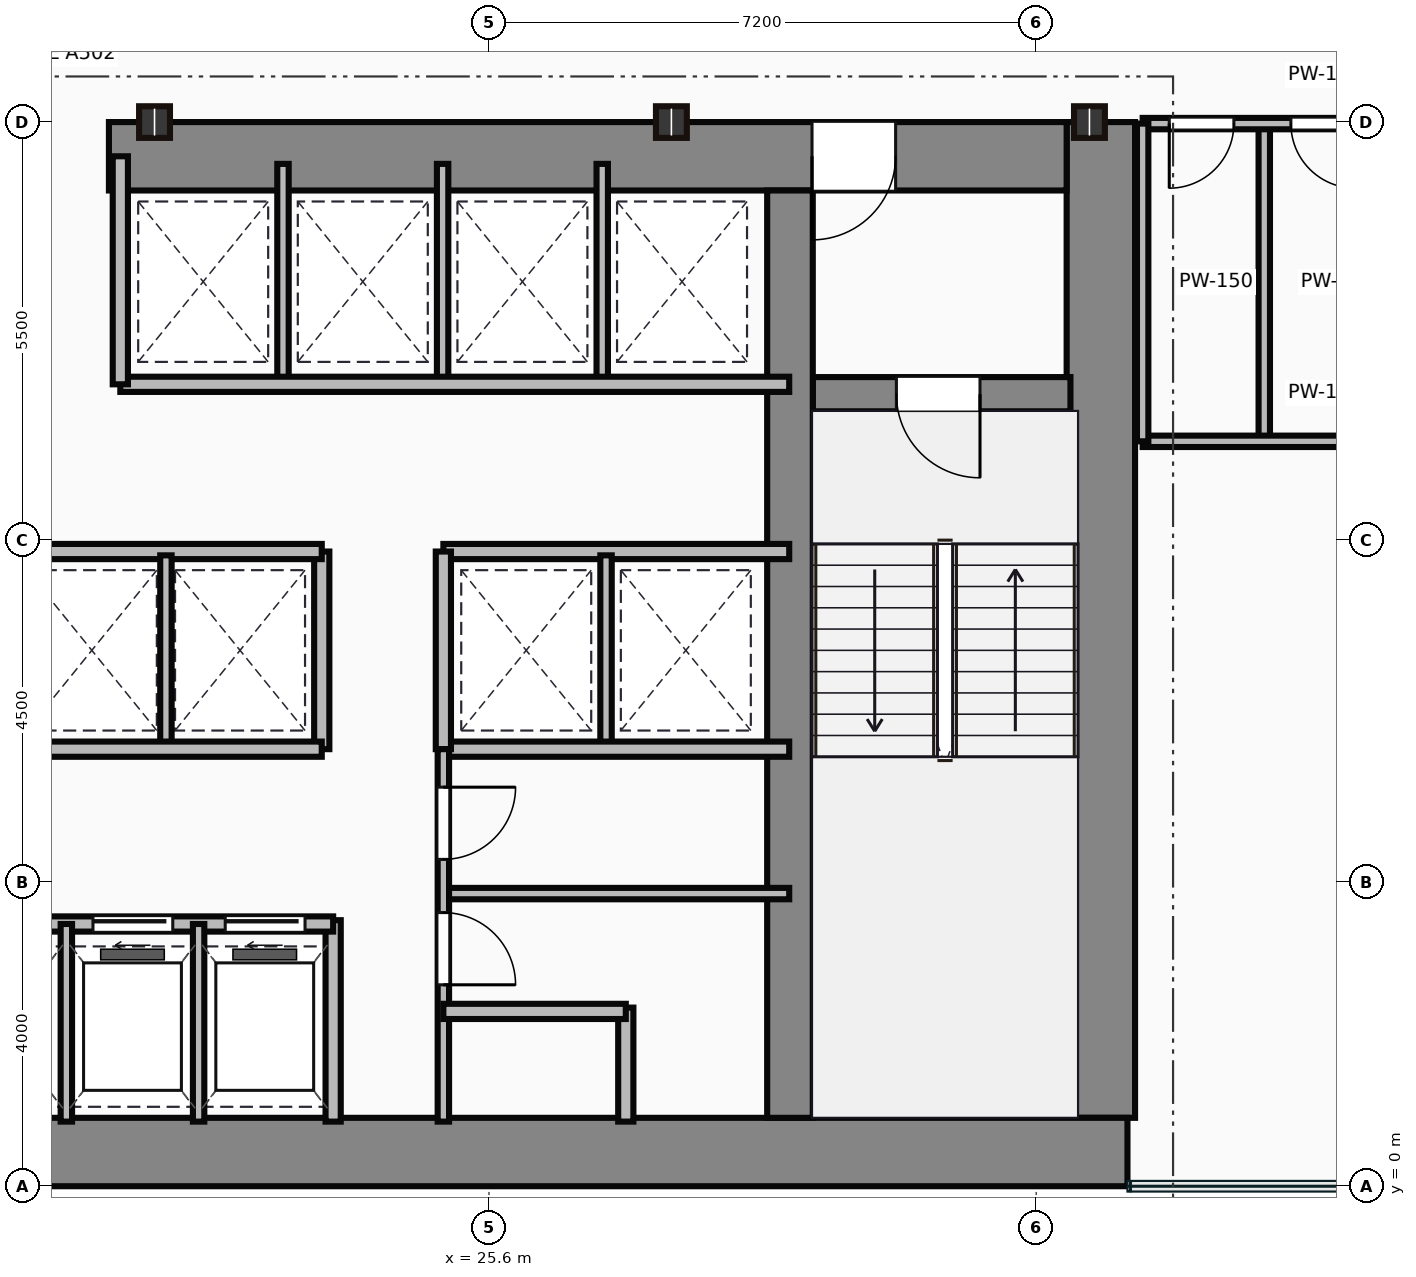
"""IFC4 building model, lengths in metres.
Left out: names, types, materials, properties, quantities, classifications, styles, units other than length and angle.
Written with IfcOpenShell. Run it as: python <this file> out.ifc"""

import sys

from ifc_helpers import new_model, si_unit, direction, frame, frame_2d, origin, origin_2d, place, context, subcontext, project, spatial, rectangle, i_section, extrude, source, transform, mapped, element, fill, save


model = new_model("IFC4")
c1 = context("Model", 3, precision=1e-05, world=origin(), true_north=direction((0.0, 1.0)))
c2 = subcontext(c1, "Body", "Model", "MODEL_VIEW")
j1 = project(units=[si_unit("LENGTHUNIT", "METRE"), si_unit("PLANEANGLEUNIT", "RADIAN")], contexts=[c1])
p1 = place(None, origin())
s1 = spatial("IfcSite", under=j1, at=p1, CompositionType="ELEMENT")
p2 = place(p1, origin())
s2 = spatial("IfcBuilding", under=s1, at=p2, CompositionType="ELEMENT")
p3 = place(p2, frame((0.0, 0.0, 32.5)))
s3 = spatial("IfcBuildingStorey", under=s2, at=p3, CompositionType="ELEMENT", Elevation=32.5)
m1 = source(origin(), c2, "Body", "SweptSolid", [
    extrude(rectangle(XDim=29.5, YDim=0.9, at=frame_2d((14.75, 0.0))), origin(), (0.0, 0.0, 1.0), 3.65),
])
p4 = place(p3, frame((4.5, 0.45, 0.0), z_axis=(0.0, 0.0, 1.0), x_axis=(1.0, 0.0, 0.0)))
e1 = element("IfcWall", 1, at=p4, inside=s3, PredefinedType="SHEAR", context=c2, shape_type="MappedRepresentation", body=[
    mapped(m1, transform((0.0, 0.0, 0.0))),
])
m2 = source(origin(), c2, "Body", "SweptSolid", [
    extrude(rectangle(XDim=13.1, YDim=0.9, at=frame_2d((6.55, 0.0))), origin(), (0.0, 0.0, 1.0), 3.65),
])
p5 = place(p3, frame((33.65, 0.9, 0.0), z_axis=(0.0, 0.0, 1.0), x_axis=(0.0, 1.0, 0.0)))
e2 = element("IfcWall", 2, at=p5, inside=s3, PredefinedType="SHEAR", context=c2, shape_type="MappedRepresentation", body=[
    mapped(m2, transform((0.0, 0.0, 0.0))),
])
m3 = source(origin(), c2, "Body", "SweptSolid", [
    extrude(rectangle(XDim=12.6, YDim=0.9, at=frame_2d((6.3, 0.0))), origin(), (0.0, 0.0, 1.0), 3.65),
])
p6 = place(p3, frame((20.6, 13.55, 0.0), z_axis=(0.0, 0.0, 1.0), x_axis=(1.0, 0.0, 0.0)))
e3 = element("IfcWall", 3, at=p6, inside=s3, PredefinedType="SHEAR", context=c2, shape_type="MappedRepresentation", body=[
    mapped(m3, transform((0.0, 0.0, 0.0))),
])
p7 = place(p6, frame((9.25, 0.0, 0.0)))
e4 = element("IfcOpeningElement", 4, at=p7, cuts=e3, PredefinedType="OPENING", context=c2, shape_type="SweptSolid", body=[
    extrude(rectangle(XDim=1.1, YDim=2.15, at=frame_2d((0.55, 1.075))), frame((0.0, 0.46, 0.0), z_axis=(0.0, -1.0, 0.0), x_axis=(1.0, 0.0, 0.0)), (0.0, 0.0, 1.0), 0.92),
])
m4 = source(origin(), c2, "Body", "SweptSolid", [
    extrude(rectangle(XDim=12.2, YDim=0.6, at=frame_2d((6.1, 0.0))), origin(), (0.0, 0.0, 1.0), 3.65),
])
p8 = place(p3, frame((29.56, 0.9, 0.0), z_axis=(0.0, 0.0, 1.0), x_axis=(0.0, 1.0, 0.0)))
e5 = element("IfcWall", 5, at=p8, inside=s3, PredefinedType="SHEAR", context=c2, shape_type="MappedRepresentation", body=[
    mapped(m4, transform((0.0, 0.0, 0.0))),
])
m5 = source(origin(), c2, "Body", "SweptSolid", [
    extrude(rectangle(XDim=3.39, YDim=0.45, at=frame_2d((1.695, 0.0))), origin(), (0.0, 0.0, 1.0), 3.65),
])
p9 = place(p3, frame((29.86, 10.42, 0.0), z_axis=(0.0, 0.0, 1.0), x_axis=(1.0, 0.0, 0.0)))
e6 = element("IfcWall", 6, at=p9, inside=s3, PredefinedType="SHEAR", context=c2, shape_type="MappedRepresentation", body=[
    mapped(m5, transform((0.0, 0.0, 0.0))),
])
p10 = place(p9, frame((1.1, 0.0, 0.0)))
e7 = element("IfcOpeningElement", 7, at=p10, cuts=e6, PredefinedType="OPENING", context=c2, shape_type="SweptSolid", body=[
    extrude(rectangle(XDim=1.1, YDim=2.15, at=frame_2d((0.55, 1.075))), frame((0.0, 0.235, 0.0), z_axis=(0.0, -1.0, 0.0), x_axis=(1.0, 0.0, 0.0)), (0.0, 0.0, 1.0), 0.47),
])
m6 = source(origin(), c2, "Body", "SweptSolid", [
    extrude(i_section(OverallWidth=0.406, OverallDepth=0.416, WebThickness=0.03, FlangeThickness=0.048, at=origin_2d()), origin(), (0.0, 0.0, 1.0), 3.65),
])
for number, where, z_axis, x_axis in (
    (8, (21.2, 14.0, 0.0), (0.0, 0.0, 1.0), (1.0, 0.0, 0.0)),
    (9, (28.0, 14.0, 0.0), (0.0, 0.0, 1.0), (1.0, 0.0, 0.0)),
    (10, (33.5, 14.0, 0.0), (0.0, 0.0, 1.0), (1.0, 0.0, 0.0)),
):
    element("IfcColumn", number, at=place(p3, frame(where, z_axis=z_axis, x_axis=x_axis)), inside=s3, PredefinedType="COLUMN", context=c2, shape_type="MappedRepresentation", body=[
        mapped(m6, transform((0.0, 0.0, 0.0))),
    ])
m7 = source(origin(), c2, "Body", "SweptSolid", [
    extrude(rectangle(XDim=10.5, YDim=0.2, at=frame_2d((5.25, 0.0))), origin(), (0.0, 0.0, 1.0), 3.4),
])
p11 = place(p3, frame((13.05, 3.45, 0.0), z_axis=(0.0, 0.0, 1.0), x_axis=(1.0, 0.0, 0.0)))
e11 = element("IfcWall", 11, at=p11, inside=s3, PredefinedType="PARTITIONING", context=c2, shape_type="MappedRepresentation", body=[
    mapped(m7, transform((0.0, 0.0, 0.0))),
])
p12 = place(p11, frame((0.38, 0.0, 0.0)))
e12 = element("IfcOpeningElement", 12, at=p12, cuts=e11, PredefinedType="OPENING", context=c2, shape_type="SweptSolid", body=[
    extrude(rectangle(XDim=1.05, YDim=2.15, at=frame_2d((0.525, 1.075))), frame((0.0, 0.11, 0.0), z_axis=(0.0, -1.0, 0.0), x_axis=(1.0, 0.0, 0.0)), (0.0, 0.0, 1.0), 0.22),
])
p13 = place(p11, frame((2.12, 0.0, 0.0)))
e13 = element("IfcOpeningElement", 13, at=p13, cuts=e11, PredefinedType="OPENING", context=c2, shape_type="SweptSolid", body=[
    extrude(rectangle(XDim=1.05, YDim=2.15, at=frame_2d((0.525, 1.075))), frame((0.0, 0.11, 0.0), z_axis=(0.0, -1.0, 0.0), x_axis=(1.0, 0.0, 0.0)), (0.0, 0.0, 1.0), 0.22),
])
p14 = place(p11, frame((3.86, 0.0, 0.0)))
e14 = element("IfcOpeningElement", 14, at=p14, cuts=e11, PredefinedType="OPENING", context=c2, shape_type="SweptSolid", body=[
    extrude(rectangle(XDim=1.05, YDim=2.15, at=frame_2d((0.525, 1.075))), frame((0.0, 0.11, 0.0), z_axis=(0.0, -1.0, 0.0), x_axis=(1.0, 0.0, 0.0)), (0.0, 0.0, 1.0), 0.22),
])
p15 = place(p11, frame((5.6, 0.0, 0.0)))
e15 = element("IfcOpeningElement", 15, at=p15, cuts=e11, PredefinedType="OPENING", context=c2, shape_type="SweptSolid", body=[
    extrude(rectangle(XDim=1.05, YDim=2.15, at=frame_2d((0.525, 1.075))), frame((0.0, 0.11, 0.0), z_axis=(0.0, -1.0, 0.0), x_axis=(1.0, 0.0, 0.0)), (0.0, 0.0, 1.0), 0.22),
])
p16 = place(p11, frame((7.34, 0.0, 0.0)))
e16 = element("IfcOpeningElement", 16, at=p16, cuts=e11, PredefinedType="OPENING", context=c2, shape_type="SweptSolid", body=[
    extrude(rectangle(XDim=1.05, YDim=2.15, at=frame_2d((0.525, 1.075))), frame((0.0, 0.11, 0.0), z_axis=(0.0, -1.0, 0.0), x_axis=(1.0, 0.0, 0.0)), (0.0, 0.0, 1.0), 0.22),
])
p17 = place(p11, frame((9.08, 0.0, 0.0)))
e17 = element("IfcOpeningElement", 17, at=p17, cuts=e11, PredefinedType="OPENING", context=c2, shape_type="SweptSolid", body=[
    extrude(rectangle(XDim=1.05, YDim=2.15, at=frame_2d((0.525, 1.075))), frame((0.0, 0.11, 0.0), z_axis=(0.0, -1.0, 0.0), x_axis=(1.0, 0.0, 0.0)), (0.0, 0.0, 1.0), 0.22),
])
m8 = source(origin(), c2, "Body", "SweptSolid", [
    extrude(rectangle(XDim=2.65, YDim=0.2, at=frame_2d((1.325, 0.0))), origin(), (0.0, 0.0, 1.0), 3.4),
])
p18 = place(p3, frame((23.55, 0.85, 0.0), z_axis=(0.0, 0.0, 1.0), x_axis=(0.0, 1.0, 0.0)))
e18 = element("IfcWall", 18, at=p18, inside=s3, PredefinedType="PARTITIONING", context=c2, shape_type="MappedRepresentation", body=[
    mapped(m8, transform((0.0, 0.0, 0.0))),
])
m9 = source(origin(), c2, "Body", "SweptSolid", [
    extrude(rectangle(XDim=2.6, YDim=0.15, at=frame_2d((1.3, 0.0))), origin(), (0.0, 0.0, 1.0), 3.4),
])
for number, where, z_axis, x_axis in (
    (19, (20.04, 0.85, 0.0), (0.0, 0.0, 1.0), (0.0, 1.0, 0.0)),
    (20, (21.78, 0.85, 0.0), (0.0, 0.0, 1.0), (0.0, 1.0, 0.0)),
):
    element("IfcWall", number, at=place(p3, frame(where, z_axis=z_axis, x_axis=x_axis)), inside=s3, PredefinedType="PARTITIONING", context=c2, shape_type="MappedRepresentation", body=[
        mapped(m9, transform((0.0, 0.0, 0.0))),
    ])
m10 = source(origin(), c2, "Body", "SweptSolid", [
    extrude(rectangle(XDim=11.85, YDim=0.2, at=frame_2d((5.925, 0.0))), origin(), (0.0, 0.0, 1.0), 3.4),
])
for number, where, z_axis, x_axis in (
    (21, (11.55, 5.75, 0.0), (0.0, 0.0, 1.0), (1.0, 0.0, 0.0)),
    (22, (11.55, 8.35, 0.0), (0.0, 0.0, 1.0), (1.0, 0.0, 0.0)),
):
    element("IfcWall", number, at=place(p3, frame(where, z_axis=z_axis, x_axis=x_axis)), inside=s3, PredefinedType="PARTITIONING", context=c2, shape_type="MappedRepresentation", body=[
        mapped(m10, transform((0.0, 0.0, 0.0))),
    ])
m11 = source(origin(), c2, "Body", "SweptSolid", [
    extrude(rectangle(XDim=2.6, YDim=0.2, at=frame_2d((1.3, 0.0))), origin(), (0.0, 0.0, 1.0), 3.4),
])
p19 = place(p3, frame((23.4, 5.75, 0.0), z_axis=(0.0, 0.0, 1.0), x_axis=(0.0, 1.0, 0.0)))
e23 = element("IfcWall", 23, at=p19, inside=s3, PredefinedType="PARTITIONING", context=c2, shape_type="MappedRepresentation", body=[
    mapped(m11, transform((0.0, 0.0, 0.0))),
])
m12 = source(origin(), c2, "Body", "SweptSolid", [
    extrude(rectangle(XDim=2.5, YDim=0.15, at=frame_2d((1.25, 0.0))), origin(), (0.0, 0.0, 1.0), 3.4),
])
p20 = place(p3, frame((21.35, 5.8, 0.0), z_axis=(0.0, 0.0, 1.0), x_axis=(0.0, 1.0, 0.0)))
e24 = element("IfcWall", 24, at=p20, inside=s3, PredefinedType="PARTITIONING", context=c2, shape_type="MappedRepresentation", body=[
    mapped(m12, transform((0.0, 0.0, 0.0))),
])
m13 = source(origin(), c2, "Body", "SweptSolid", [
    extrude(rectangle(XDim=8.8, YDim=0.2, at=frame_2d((4.4, 0.0))), origin(), (0.0, 0.0, 1.0), 3.4),
])
p21 = place(p3, frame((20.75, 10.55, 0.0), z_axis=(0.0, 0.0, 1.0), x_axis=(1.0, 0.0, 0.0)))
e25 = element("IfcWall", 25, at=p21, inside=s3, PredefinedType="PARTITIONING", context=c2, shape_type="MappedRepresentation", body=[
    mapped(m13, transform((0.0, 0.0, 0.0))),
])
m14 = source(origin(), c2, "Body", "SweptSolid", [
    extrude(rectangle(XDim=3.0, YDim=0.2, at=frame_2d((1.5, 0.0))), origin(), (0.0, 0.0, 1.0), 3.4),
])
p22 = place(p3, frame((20.75, 10.55, 0.0), z_axis=(0.0, 0.0, 1.0), x_axis=(0.0, 1.0, 0.0)))
e26 = element("IfcWall", 26, at=p22, inside=s3, PredefinedType="PARTITIONING", context=c2, shape_type="MappedRepresentation", body=[
    mapped(m14, transform((0.0, 0.0, 0.0))),
])
m15 = source(origin(), c2, "Body", "SweptSolid", [
    extrude(rectangle(XDim=2.85, YDim=0.15, at=frame_2d((1.425, 0.0))), origin(), (0.0, 0.0, 1.0), 3.4),
])
for number, where, z_axis, x_axis in (
    (27, (22.89, 10.6, 0.0), (0.0, 0.0, 1.0), (0.0, 1.0, 0.0)),
    (28, (24.99, 10.6, 0.0), (0.0, 0.0, 1.0), (0.0, 1.0, 0.0)),
    (29, (27.09, 10.6, 0.0), (0.0, 0.0, 1.0), (0.0, 1.0, 0.0)),
):
    element("IfcWall", number, at=place(p3, frame(where, z_axis=z_axis, x_axis=x_axis)), inside=s3, PredefinedType="PARTITIONING", context=c2, shape_type="MappedRepresentation", body=[
        mapped(m15, transform((0.0, 0.0, 0.0))),
    ])
m16 = source(origin(), c2, "Body", "SweptSolid", [
    extrude(rectangle(XDim=4.55, YDim=0.2, at=frame_2d((2.275, 0.0))), origin(), (0.0, 0.0, 1.0), 3.4),
])
for number, where, z_axis, x_axis in (
    (30, (25.0, 8.35, 0.0), (0.0, 0.0, 1.0), (1.0, 0.0, 0.0)),
    (31, (25.0, 5.75, 0.0), (0.0, 0.0, 1.0), (1.0, 0.0, 0.0)),
):
    element("IfcWall", number, at=place(p3, frame(where, z_axis=z_axis, x_axis=x_axis)), inside=s3, PredefinedType="PARTITIONING", context=c2, shape_type="MappedRepresentation", body=[
        mapped(m16, transform((0.0, 0.0, 0.0))),
    ])
p23 = place(p3, frame((25.0, 5.75, 0.0), z_axis=(0.0, 0.0, 1.0), x_axis=(0.0, 1.0, 0.0)))
e32 = element("IfcWall", 32, at=p23, inside=s3, PredefinedType="PARTITIONING", context=c2, shape_type="MappedRepresentation", body=[
    mapped(m11, transform((0.0, 0.0, 0.0))),
])
p24 = place(p3, frame((27.14, 5.8, 0.0), z_axis=(0.0, 0.0, 1.0), x_axis=(0.0, 1.0, 0.0)))
e33 = element("IfcWall", 33, at=p24, inside=s3, PredefinedType="PARTITIONING", context=c2, shape_type="MappedRepresentation", body=[
    mapped(m12, transform((0.0, 0.0, 0.0))),
])
m17 = source(origin(), c2, "Body", "SweptSolid", [
    extrude(rectangle(XDim=4.9, YDim=0.15, at=frame_2d((2.45, 0.0))), origin(), (0.0, 0.0, 1.0), 3.4),
])
p25 = place(p3, frame((25.0, 0.85, 0.0), z_axis=(0.0, 0.0, 1.0), x_axis=(0.0, 1.0, 0.0)))
e34 = element("IfcWall", 34, at=p25, inside=s3, PredefinedType="PARTITIONING", context=c2, shape_type="MappedRepresentation", body=[
    mapped(m17, transform((0.0, 0.0, 0.0))),
])
p26 = place(p25, frame((1.8, 0.0, 0.0)))
e35 = element("IfcOpeningElement", 35, at=p26, cuts=e34, PredefinedType="OPENING", context=c2, shape_type="SweptSolid", body=[
    extrude(rectangle(XDim=0.95, YDim=2.15, at=frame_2d((0.475, 1.075))), frame((0.0, 0.085, 0.0), z_axis=(0.0, -1.0, 0.0), x_axis=(1.0, 0.0, 0.0)), (0.0, 0.0, 1.0), 0.17),
])
p27 = place(p25, frame((3.45, 0.0, 0.0)))
e36 = element("IfcOpeningElement", 36, at=p27, cuts=e34, PredefinedType="OPENING", context=c2, shape_type="SweptSolid", body=[
    extrude(rectangle(XDim=0.95, YDim=2.15, at=frame_2d((0.475, 1.075))), frame((0.0, 0.085, 0.0), z_axis=(0.0, -1.0, 0.0), x_axis=(1.0, 0.0, 0.0)), (0.0, 0.0, 1.0), 0.17),
])
m18 = source(origin(), c2, "Body", "SweptSolid", [
    extrude(rectangle(XDim=2.4, YDim=0.2, at=frame_2d((1.2, 0.0))), origin(), (0.0, 0.0, 1.0), 3.4),
])
p28 = place(p3, frame((25.0, 2.3, 0.0), z_axis=(0.0, 0.0, 1.0), x_axis=(1.0, 0.0, 0.0)))
e37 = element("IfcWall", 37, at=p28, inside=s3, PredefinedType="PARTITIONING", context=c2, shape_type="MappedRepresentation", body=[
    mapped(m18, transform((0.0, 0.0, 0.0))),
])
m19 = source(origin(), c2, "Body", "SweptSolid", [
    extrude(rectangle(XDim=1.5, YDim=0.2, at=frame_2d((0.75, 0.0))), origin(), (0.0, 0.0, 1.0), 3.4),
])
p29 = place(p3, frame((27.4, 0.85, 0.0), z_axis=(0.0, 0.0, 1.0), x_axis=(0.0, 1.0, 0.0)))
e38 = element("IfcWall", 38, at=p29, inside=s3, PredefinedType="PARTITIONING", context=c2, shape_type="MappedRepresentation", body=[
    mapped(m19, transform((0.0, 0.0, 0.0))),
])
m20 = source(origin(), c2, "Body", "SweptSolid", [
    extrude(rectangle(XDim=4.55, YDim=0.15, at=frame_2d((2.275, 0.0))), origin(), (0.0, 0.0, 1.0), 3.4),
])
p30 = place(p3, frame((25.0, 3.85, 0.0), z_axis=(0.0, 0.0, 1.0), x_axis=(1.0, 0.0, 0.0)))
e39 = element("IfcWall", 39, at=p30, inside=s3, PredefinedType="PARTITIONING", context=c2, shape_type="MappedRepresentation", body=[
    mapped(m20, transform((0.0, 0.0, 0.0))),
])
m21 = source(origin(), c2, "Body", "SweptSolid", [
    extrude(rectangle(XDim=4.8, YDim=0.15, at=frame_2d((2.4, 0.0))), origin(), (0.0, 0.0, 1.0), 2.625),
])
p31 = place(p3, frame((34.2, 13.98, 0.0), z_axis=(0.0, 0.0, 1.0), x_axis=(1.0, 0.0, 0.0)))
e40 = element("IfcWall", 40, at=p31, inside=s3, PredefinedType="PARTITIONING", context=c2, shape_type="MappedRepresentation", body=[
    mapped(m21, transform((0.0, 0.0, 0.0))),
])
p32 = place(p31, frame((0.35, 0.0, 0.0)))
e41 = element("IfcOpeningElement", 41, at=p32, cuts=e40, PredefinedType="OPENING", context=c2, shape_type="SweptSolid", body=[
    extrude(rectangle(XDim=0.85, YDim=2.1, at=frame_2d((0.425, 1.05))), frame((0.0, 0.085, 0.0), z_axis=(0.0, -1.0, 0.0), x_axis=(1.0, 0.0, 0.0)), (0.0, 0.0, 1.0), 0.17),
])
p33 = place(p31, frame((1.95, 0.0, 0.0)))
e42 = element("IfcOpeningElement", 42, at=p33, cuts=e40, PredefinedType="OPENING", context=c2, shape_type="SweptSolid", body=[
    extrude(rectangle(XDim=0.85, YDim=2.1, at=frame_2d((0.425, 1.05))), frame((0.0, 0.085, 0.0), z_axis=(0.0, -1.0, 0.0), x_axis=(1.0, 0.0, 0.0)), (0.0, 0.0, 1.0), 0.17),
])
p34 = place(p31, frame((3.5, 0.0, 0.0)))
e43 = element("IfcOpeningElement", 43, at=p34, cuts=e40, PredefinedType="OPENING", context=c2, shape_type="SweptSolid", body=[
    extrude(rectangle(XDim=0.9, YDim=2.1, at=frame_2d((0.45, 1.05))), frame((0.0, 0.085, 0.0), z_axis=(0.0, -1.0, 0.0), x_axis=(1.0, 0.0, 0.0)), (0.0, 0.0, 1.0), 0.17),
])
m22 = source(origin(), c2, "Body", "SweptSolid", [
    extrude(rectangle(XDim=4.8, YDim=0.15, at=frame_2d((2.4, 0.0))), origin(), (0.0, 0.0, 1.0), 3.4),
])
p35 = place(p3, frame((34.2, 9.8, 0.0), z_axis=(0.0, 0.0, 1.0), x_axis=(1.0, 0.0, 0.0)))
e44 = element("IfcWall", 44, at=p35, inside=s3, PredefinedType="PARTITIONING", context=c2, shape_type="MappedRepresentation", body=[
    mapped(m22, transform((0.0, 0.0, 0.0))),
])
m23 = source(origin(), c2, "Body", "SweptSolid", [
    extrude(rectangle(XDim=4.18, YDim=0.15, at=frame_2d((2.09, 0.0))), origin(), (0.0, 0.0, 1.0), 3.4),
])
for number, where, z_axis, x_axis in (
    (45, (34.2, 9.8, 0.0), (0.0, 0.0, 1.0), (0.0, 1.0, 0.0)),
    (46, (35.8, 9.8, 0.0), (0.0, 0.0, 1.0), (0.0, 1.0, 0.0)),
):
    element("IfcWall", number, at=place(p3, frame(where, z_axis=z_axis, x_axis=x_axis)), inside=s3, PredefinedType="PARTITIONING", context=c2, shape_type="MappedRepresentation", body=[
        mapped(m23, transform((0.0, 0.0, 0.0))),
    ])
m24 = source(origin(), c2, "Body", "SweptSolid", [
    extrude(rectangle(XDim=1.1, YDim=2.15, at=frame_2d((0.55, 1.075))), frame((0.0, 0.025, 0.0), z_axis=(0.0, -1.0, 0.0), x_axis=(1.0, 0.0, 0.0)), (0.0, 0.0, 1.0), 0.05),
])
p36 = place(p10, frame((1.1, 0.0, 0.0), z_axis=(0.0, 0.0, 1.0), x_axis=(-1.0, 0.0, 0.0)))
e47 = element("IfcDoor", 47, at=p36, inside=s3, OperationType="SINGLE_SWING_RIGHT", PredefinedType="DOOR", context=c2, shape_type="MappedRepresentation", body=[
    mapped(m24, transform((0.0, 0.0, 0.0))),
])
fill(e7, e47)
p37 = place(p7, origin())
e48 = element("IfcDoor", 48, at=p37, inside=s3, OperationType="SINGLE_SWING_LEFT", PredefinedType="DOOR", context=c2, shape_type="MappedRepresentation", body=[
    mapped(m24, transform((0.0, 0.0, 0.0))),
])
fill(e4, e48)
m25 = source(origin(), c2, "Body", "SweptSolid", [
    extrude(rectangle(XDim=1.05, YDim=2.15, at=frame_2d((0.525, 1.075))), frame((0.0, 0.025, 0.0), z_axis=(0.0, -1.0, 0.0), x_axis=(1.0, 0.0, 0.0)), (0.0, 0.0, 1.0), 0.05),
])
p38 = place(p16, origin())
e49 = element("IfcDoor", 49, at=p38, inside=s3, OperationType="SLIDING_TO_LEFT", PredefinedType="DOOR", context=c2, shape_type="MappedRepresentation", body=[
    mapped(m25, transform((0.0, 0.0, 0.0))),
])
fill(e16, e49)
p39 = place(p17, origin())
e50 = element("IfcDoor", 50, at=p39, inside=s3, OperationType="SLIDING_TO_LEFT", PredefinedType="DOOR", context=c2, shape_type="MappedRepresentation", body=[
    mapped(m25, transform((0.0, 0.0, 0.0))),
])
fill(e17, e50)
m26 = source(origin(), c2, "Body", "SweptSolid", [
    extrude(rectangle(XDim=0.95, YDim=2.15, at=frame_2d((0.475, 1.075))), frame((0.0, 0.025, 0.0), z_axis=(0.0, -1.0, 0.0), x_axis=(1.0, 0.0, 0.0)), (0.0, 0.0, 1.0), 0.05),
])
p40 = place(p26, origin())
e51 = element("IfcDoor", 51, at=p40, inside=s3, OperationType="SINGLE_SWING_LEFT", PredefinedType="DOOR", context=c2, shape_type="MappedRepresentation", body=[
    mapped(m26, transform((0.0, 0.0, 0.0))),
])
fill(e35, e51)
p41 = place(p27, origin())
e52 = element("IfcDoor", 52, at=p41, inside=s3, OperationType="SINGLE_SWING_RIGHT", PredefinedType="DOOR", context=c2, shape_type="MappedRepresentation", body=[
    mapped(m26, transform((0.0, 0.0, 0.0))),
])
fill(e36, e52)
m27 = source(origin(), c2, "Body", "SweptSolid", [
    extrude(rectangle(XDim=0.85, YDim=2.1, at=frame_2d((0.425, 1.05))), frame((0.0, 0.025, 0.0), z_axis=(0.0, -1.0, 0.0), x_axis=(1.0, 0.0, 0.0)), (0.0, 0.0, 1.0), 0.05),
])
p42 = place(p32, frame((0.85, 0.0, 0.0), z_axis=(0.0, 0.0, 1.0), x_axis=(-1.0, 0.0, 0.0)))
e53 = element("IfcDoor", 53, at=p42, inside=s3, OperationType="SINGLE_SWING_LEFT", PredefinedType="DOOR", context=c2, shape_type="MappedRepresentation", body=[
    mapped(m27, transform((0.0, 0.0, 0.0))),
])
fill(e41, e53)
p43 = place(p33, frame((0.85, 0.0, 0.0), z_axis=(0.0, 0.0, 1.0), x_axis=(-1.0, 0.0, 0.0)))
e54 = element("IfcDoor", 54, at=p43, inside=s3, OperationType="SINGLE_SWING_RIGHT", PredefinedType="DOOR", context=c2, shape_type="MappedRepresentation", body=[
    mapped(m27, transform((0.0, 0.0, 0.0))),
])
fill(e42, e54)
save(model, sys.argv[1])
